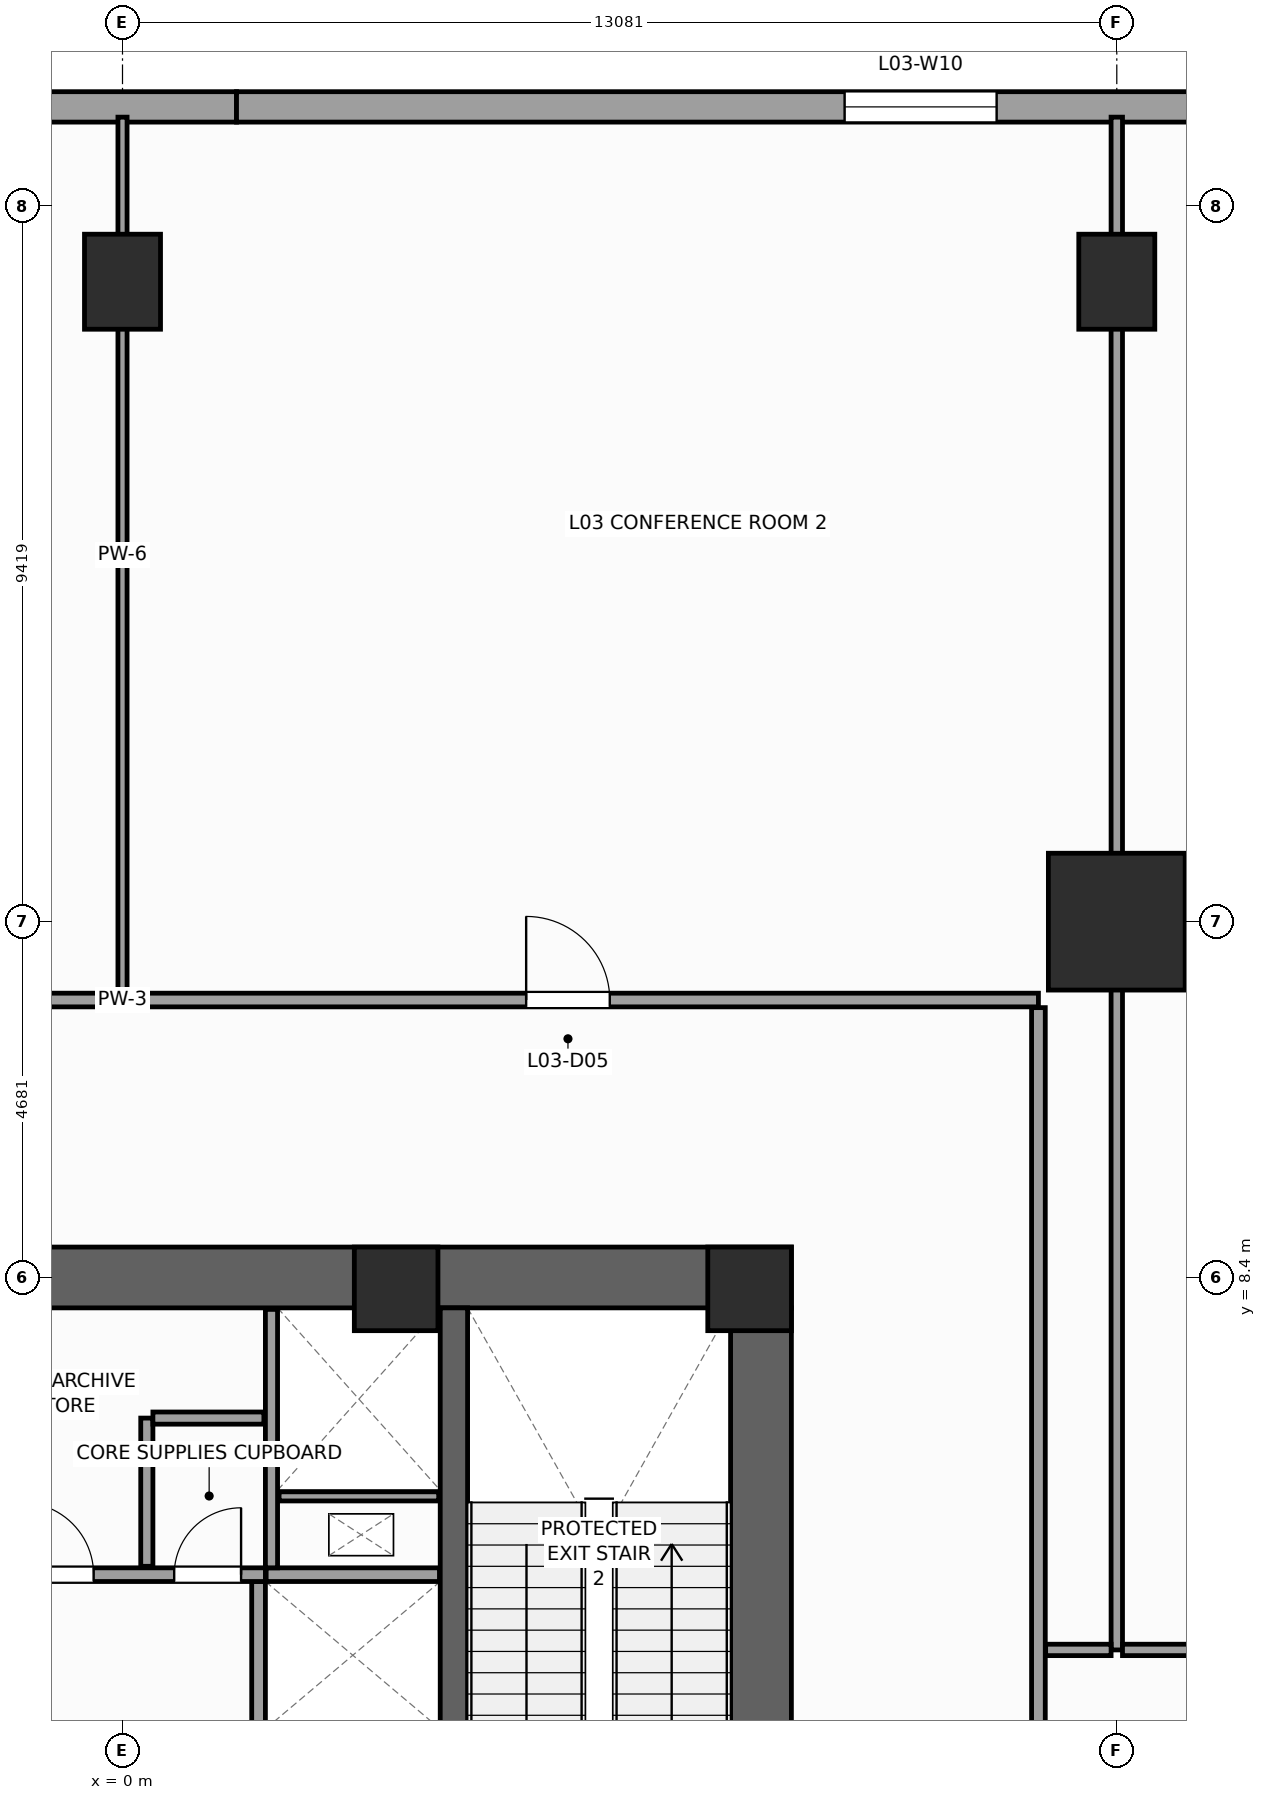
"""IFC4 building model, lengths in metres.
Left out: names, types, materials, properties, quantities, classifications, styles, units other than length and angle.
Written with IfcOpenShell. Run it as: python <this file> out.ifc"""

import sys

from ifc_helpers import new_model, si_unit, direction, frame, frame_2d, origin, origin_2d, place, context, subcontext, project, spatial, rectangle, extrude, source, transform, mapped, element, fill, save


model = new_model("IFC4")
c1 = context("Model", 3, precision=1e-05, world=origin(), true_north=direction((0.0, 1.0)))
c2 = subcontext(c1, "Body", "Model", "MODEL_VIEW")
j1 = project(units=[si_unit("LENGTHUNIT", "METRE"), si_unit("PLANEANGLEUNIT", "RADIAN")], contexts=[c1])
p1 = place(None, origin())
s1 = spatial("IfcSite", under=j1, at=p1, CompositionType="ELEMENT")
p2 = place(p1, origin())
s2 = spatial("IfcBuilding", under=s1, at=p2, CompositionType="ELEMENT")
p3 = place(p2, frame((0.0, 0.0, 16.0)))
s3 = spatial("IfcBuildingStorey", under=s2, at=p3, CompositionType="ELEMENT", Elevation=16.0)
p4 = place(p3, frame((-8.8, 8.4, 0.0), z_axis=(0.0, 0.0, 1.0), x_axis=(1.0, 0.0, 0.0)))
e1 = element("IfcWall", 1, at=p4, inside=s3, PredefinedType="SHEAR", context=c2, shape_type="SweptSolid", body=[
    extrude(rectangle(XDim=17.6, YDim=0.8, at=frame_2d((8.8, 0.0))), origin(), (0.0, 0.0, 1.0), 5.0),
])
p5 = place(p3, frame((8.4, -8.0, 0.0), z_axis=(0.0, 0.0, 1.0), x_axis=(0.0, 1.0, 0.0)))
e2 = element("IfcWall", 2, at=p5, inside=s3, PredefinedType="SHEAR", context=c2, shape_type="SweptSolid", body=[
    extrude(rectangle(XDim=16.0, YDim=0.8, at=frame_2d((8.0, 0.0))), origin(), (0.0, 0.0, 1.0), 5.0),
])
p6 = place(p5, frame((4.69, 0.0, 0.0)))
e3 = element("IfcOpeningElement", 3, at=p6, cuts=e2, PredefinedType="OPENING", context=c2, shape_type="SweptSolid", body=[
    extrude(rectangle(XDim=1.3, YDim=2.2, at=frame_2d((0.65, 1.1))), frame((0.0, 0.41, 0.0), z_axis=(0.0, -1.0, 0.0), x_axis=(1.0, 0.0, 0.0)), (0.0, 0.0, 1.0), 0.82),
])
p7 = place(p3, frame((4.36, -8.0, 0.0), z_axis=(0.0, 0.0, 1.0), x_axis=(0.0, 1.0, 0.0)))
e4 = element("IfcWall", 4, at=p7, inside=s3, PredefinedType="SHEAR", context=c2, shape_type="SweptSolid", body=[
    extrude(rectangle(XDim=16.0, YDim=0.36, at=frame_2d((8.0, 0.0))), origin(), (0.0, 0.0, 1.0), 5.0),
])
m1 = source(origin(), c2, "Body", "SweptSolid", [
    extrude(rectangle(XDim=1.1, YDim=1.1, at=origin_2d()), origin(), (0.0, 0.0, 1.0), 5.0),
])
for number, where, z_axis, x_axis in (
    (5, (8.25, 8.25, 0.0), (0.0, 0.0, 1.0), (1.0, 0.0, 0.0)),
    (6, (3.6, 8.25, 0.0), (0.0, 0.0, 1.0), (1.0, 0.0, 0.0)),
):
    element("IfcColumn", number, at=place(p3, frame(where, z_axis=z_axis, x_axis=x_axis)), inside=s3, PredefinedType="PILASTER", context=c2, shape_type="MappedRepresentation", body=[
        mapped(m1, transform((0.0, 0.0, 0.0), scale=1.0)),
    ])
m2 = source(origin(), c2, "Body", "SweptSolid", [
    extrude(rectangle(XDim=1.8, YDim=1.8, at=origin_2d()), origin(), (0.0, 0.0, 1.0), 5.0),
])
p8 = place(p3, frame((13.081, 13.081, 0.0), z_axis=(0.0, 0.0, 1.0), x_axis=(1.0, 0.0, 0.0)))
e7 = element("IfcColumn", 7, at=p8, inside=s3, PredefinedType="COLUMN", context=c2, shape_type="MappedRepresentation", body=[
    mapped(m2, transform((0.0, 0.0, 0.0), scale=1.0)),
])
m3 = source(origin(), c2, "Body", "SweptSolid", [
    extrude(rectangle(XDim=1.0, YDim=1.25, at=origin_2d()), origin(), (0.0, 0.0, 1.0), 5.0),
])
for number, where, z_axis, x_axis in (
    (8, (0.0, 21.5, 0.0), (0.0, 0.0, 1.0), (1.0, 0.0, 0.0)),
    (9, (13.081, 21.5, 0.0), (0.0, 0.0, 1.0), (1.0, 0.0, 0.0)),
):
    element("IfcColumn", number, at=place(p3, frame(where, z_axis=z_axis, x_axis=x_axis)), inside=s3, PredefinedType="COLUMN", context=c2, shape_type="MappedRepresentation", body=[
        mapped(m3, transform((0.0, 0.0, 0.0), scale=1.0)),
    ])
p9 = place(p3, frame((-33.0, 23.8, 0.0), z_axis=(0.0, 0.0, 1.0), x_axis=(1.0, 0.0, 0.0)))
e10 = element("IfcWall", 10, at=p9, inside=s3, PredefinedType="STANDARD", context=c2, shape_type="SweptSolid", body=[
    extrude(rectangle(XDim=34.5, YDim=0.4, at=frame_2d((17.25, 0.0))), origin(), (0.0, 0.0, 1.0), 4.66),
])
p10 = place(p9, frame((11.0, 0.0, 0.85)))
e11 = element("IfcOpeningElement", 11, at=p10, cuts=e10, PredefinedType="OPENING", context=c2, shape_type="SweptSolid", body=[
    extrude(rectangle(XDim=2.0, YDim=2.8, at=frame_2d((1.0, 1.4))), frame((0.0, 0.21, 0.0), z_axis=(0.0, -1.0, 0.0), x_axis=(1.0, 0.0, 0.0)), (0.0, 0.0, 1.0), 0.42),
])
p11 = place(p9, frame((16.0, 0.0, 0.85)))
e12 = element("IfcOpeningElement", 12, at=p11, cuts=e10, PredefinedType="OPENING", context=c2, shape_type="SweptSolid", body=[
    extrude(rectangle(XDim=2.0, YDim=2.8, at=frame_2d((1.0, 1.4))), frame((0.0, 0.21, 0.0), z_axis=(0.0, -1.0, 0.0), x_axis=(1.0, 0.0, 0.0)), (0.0, 0.0, 1.0), 0.42),
])
p12 = place(p9, frame((21.5, 0.0, 0.85)))
e13 = element("IfcOpeningElement", 13, at=p12, cuts=e10, PredefinedType="OPENING", context=c2, shape_type="SweptSolid", body=[
    extrude(rectangle(XDim=2.0, YDim=2.8, at=frame_2d((1.0, 1.4))), frame((0.0, 0.21, 0.0), z_axis=(0.0, -1.0, 0.0), x_axis=(1.0, 0.0, 0.0)), (0.0, 0.0, 1.0), 0.42),
])
p13 = place(p3, frame((1.5, 23.8, 0.0), z_axis=(0.0, 0.0, 1.0), x_axis=(1.0, 0.0, 0.0)))
e14 = element("IfcWall", 14, at=p13, inside=s3, PredefinedType="STANDARD", context=c2, shape_type="SweptSolid", body=[
    extrude(rectangle(XDim=31.5, YDim=0.4, at=frame_2d((15.75, 0.0))), origin(), (0.0, 0.0, 1.0), 4.66),
])
p14 = place(p13, frame((8.0, 0.0, 0.85)))
e15 = element("IfcOpeningElement", 15, at=p14, cuts=e14, PredefinedType="OPENING", context=c2, shape_type="SweptSolid", body=[
    extrude(rectangle(XDim=2.0, YDim=2.8, at=frame_2d((1.0, 1.4))), frame((0.0, 0.21, 0.0), z_axis=(0.0, -1.0, 0.0), x_axis=(1.0, 0.0, 0.0)), (0.0, 0.0, 1.0), 0.42),
])
p15 = place(p13, frame((13.5, 0.0, 0.85)))
e16 = element("IfcOpeningElement", 16, at=p15, cuts=e14, PredefinedType="OPENING", context=c2, shape_type="SweptSolid", body=[
    extrude(rectangle(XDim=2.0, YDim=2.8, at=frame_2d((1.0, 1.4))), frame((0.0, 0.21, 0.0), z_axis=(0.0, -1.0, 0.0), x_axis=(1.0, 0.0, 0.0)), (0.0, 0.0, 1.0), 0.42),
])
p16 = place(p13, frame((18.5, 0.0, 0.85)))
e17 = element("IfcOpeningElement", 17, at=p16, cuts=e14, PredefinedType="OPENING", context=c2, shape_type="SweptSolid", body=[
    extrude(rectangle(XDim=2.0, YDim=2.8, at=frame_2d((1.0, 1.4))), frame((0.0, 0.21, 0.0), z_axis=(0.0, -1.0, 0.0), x_axis=(1.0, 0.0, 0.0)), (0.0, 0.0, 1.0), 0.42),
])
p17 = place(p3, frame((1.79, -7.98, 0.0), z_axis=(0.0, 0.0, 1.0), x_axis=(0.0, 1.0, 0.0)))
e18 = element("IfcWall", 18, at=p17, inside=s3, PredefinedType="PARTITIONING", context=c2, shape_type="SweptSolid", body=[
    extrude(rectangle(XDim=12.38, YDim=0.18, at=frame_2d((6.19, 0.0))), origin(), (0.0, 0.0, 1.0), 4.66),
])
p18 = place(p17, frame((0.4, 0.0, 0.0)))
e19 = element("IfcOpeningElement", 19, at=p18, cuts=e18, PredefinedType="OPENING", context=c2, shape_type="SweptSolid", body=[
    extrude(rectangle(XDim=1.1, YDim=2.2, at=frame_2d((0.55, 1.1))), frame((0.0, 0.1, 0.0), z_axis=(0.0, -1.0, 0.0), x_axis=(1.0, 0.0, 0.0)), (0.0, 0.0, 1.0), 0.2),
])
p19 = place(p17, frame((2.46, 0.0, 0.0)))
e20 = element("IfcOpeningElement", 20, at=p19, cuts=e18, PredefinedType="OPENING", context=c2, shape_type="SweptSolid", body=[
    extrude(rectangle(XDim=1.1, YDim=2.2, at=frame_2d((0.55, 1.1))), frame((0.0, 0.1, 0.0), z_axis=(0.0, -1.0, 0.0), x_axis=(1.0, 0.0, 0.0)), (0.0, 0.0, 1.0), 0.2),
])
p20 = place(p3, frame((-1.88, 4.49, 0.0), z_axis=(0.0, 0.0, 1.0), x_axis=(1.0, 0.0, 0.0)))
e21 = element("IfcWall", 21, at=p20, inside=s3, PredefinedType="PARTITIONING", context=c2, shape_type="SweptSolid", body=[
    extrude(rectangle(XDim=3.76, YDim=0.18, at=frame_2d((1.88, 0.0))), origin(), (0.0, 0.0, 1.0), 4.66),
])
p21 = place(p20, frame((0.55, 0.0, 0.0)))
e22 = element("IfcOpeningElement", 22, at=p21, cuts=e21, PredefinedType="OPENING", context=c2, shape_type="SweptSolid", body=[
    extrude(rectangle(XDim=0.95, YDim=2.1, at=frame_2d((0.475, 1.05))), frame((0.0, 0.1, 0.0), z_axis=(0.0, -1.0, 0.0), x_axis=(1.0, 0.0, 0.0)), (0.0, 0.0, 1.0), 0.2),
])
p22 = place(p20, frame((2.56, 0.0, 0.0)))
e23 = element("IfcOpeningElement", 23, at=p22, cuts=e21, PredefinedType="OPENING", context=c2, shape_type="SweptSolid", body=[
    extrude(rectangle(XDim=0.88, YDim=2.1, at=frame_2d((0.44, 1.05))), frame((0.0, 0.1, 0.0), z_axis=(0.0, -1.0, 0.0), x_axis=(1.0, 0.0, 0.0)), (0.0, 0.0, 1.0), 0.2),
])
p23 = place(p3, frame((1.89, 4.49, 0.0), z_axis=(0.0, 0.0, 1.0), x_axis=(1.0, 0.0, 0.0)))
e24 = element("IfcWall", 24, at=p23, inside=s3, PredefinedType="PARTITIONING", context=c2, shape_type="SweptSolid", body=[
    extrude(rectangle(XDim=2.28, YDim=0.18, at=frame_2d((1.14, 0.0))), origin(), (0.0, 0.0, 1.0), 4.66),
])
p24 = place(p3, frame((1.96, 4.58, 0.0), z_axis=(0.0, 0.0, 1.0), x_axis=(0.0, 1.0, 0.0)))
e25 = element("IfcWall", 25, at=p24, inside=s3, PredefinedType="PARTITIONING", context=c2, shape_type="SweptSolid", body=[
    extrude(rectangle(XDim=3.4, YDim=0.16, at=frame_2d((1.7, 0.0))), origin(), (0.0, 0.0, 1.0), 4.66),
])
p25 = place(p3, frame((2.06, 5.52, 0.0), z_axis=(0.0, 0.0, 1.0), x_axis=(1.0, 0.0, 0.0)))
e26 = element("IfcWall", 26, at=p25, inside=s3, PredefinedType="PARTITIONING", context=c2, shape_type="SweptSolid", body=[
    extrude(rectangle(XDim=2.1, YDim=0.12, at=frame_2d((1.05, 0.0))), origin(), (0.0, 0.0, 1.0), 4.66),
])
p26 = place(p3, frame((0.32, 4.6, 0.0), z_axis=(0.0, 0.0, 1.0), x_axis=(0.0, 1.0, 0.0)))
e27 = element("IfcWall", 27, at=p26, inside=s3, PredefinedType="PARTITIONING", context=c2, shape_type="SweptSolid", body=[
    extrude(rectangle(XDim=1.95, YDim=0.16, at=frame_2d((0.975, 0.0))), origin(), (0.0, 0.0, 1.0), 4.66),
])
p27 = place(p3, frame((0.4, 6.55, 0.0), z_axis=(0.0, 0.0, 1.0), x_axis=(1.0, 0.0, 0.0)))
e28 = element("IfcWall", 28, at=p27, inside=s3, PredefinedType="PARTITIONING", context=c2, shape_type="SweptSolid", body=[
    extrude(rectangle(XDim=1.46, YDim=0.16, at=frame_2d((0.73, 0.0))), origin(), (0.0, 0.0, 1.0), 4.66),
])
p28 = place(p3, frame((-12.05, 12.05, 0.0), z_axis=(0.0, 0.0, 1.0), x_axis=(1.0, 0.0, 0.0)))
e29 = element("IfcWall", 29, at=p28, inside=s3, PredefinedType="PARTITIONING", context=c2, shape_type="SweptSolid", body=[
    extrude(rectangle(XDim=24.1, YDim=0.18, at=frame_2d((12.05, 0.0))), origin(), (0.0, 0.0, 1.0), 4.66),
])
p29 = place(p28, frame((5.639, 0.0, 0.0)))
e30 = element("IfcOpeningElement", 30, at=p29, cuts=e29, PredefinedType="OPENING", context=c2, shape_type="SweptSolid", body=[
    extrude(rectangle(XDim=1.1, YDim=2.2, at=frame_2d((0.55, 1.1))), frame((0.0, 0.1, 0.0), z_axis=(0.0, -1.0, 0.0), x_axis=(1.0, 0.0, 0.0)), (0.0, 0.0, 1.0), 0.2),
])
p30 = place(p28, frame((17.361, 0.0, 0.0)))
e31 = element("IfcOpeningElement", 31, at=p30, cuts=e29, PredefinedType="OPENING", context=c2, shape_type="SweptSolid", body=[
    extrude(rectangle(XDim=1.1, YDim=2.2, at=frame_2d((0.55, 1.1))), frame((0.0, 0.1, 0.0), z_axis=(0.0, -1.0, 0.0), x_axis=(1.0, 0.0, 0.0)), (0.0, 0.0, 1.0), 0.2),
])
p31 = place(p3, frame((12.05, -4.96, 0.0), z_axis=(0.0, 0.0, 1.0), x_axis=(0.0, 1.0, 0.0)))
e32 = element("IfcWall", 32, at=p31, inside=s3, PredefinedType="PARTITIONING", context=c2, shape_type="SweptSolid", body=[
    extrude(rectangle(XDim=16.91, YDim=0.18, at=frame_2d((8.455, 0.0))), origin(), (0.0, 0.0, 1.0), 4.66),
])
p32 = place(p31, frame((5.835, 0.0, 0.0)))
e33 = element("IfcOpeningElement", 33, at=p32, cuts=e32, PredefinedType="OPENING", context=c2, shape_type="SweptSolid", body=[
    extrude(rectangle(XDim=0.95, YDim=2.15, at=frame_2d((0.475, 1.075))), frame((0.0, 0.1, 0.0), z_axis=(0.0, -1.0, 0.0), x_axis=(1.0, 0.0, 0.0)), (0.0, 0.0, 1.0), 0.2),
])
p33 = place(p3, frame((0.0, 12.145, 0.0), z_axis=(0.0, 0.0, 1.0), x_axis=(0.0, 1.0, 0.0)))
e34 = element("IfcWall", 34, at=p33, inside=s3, PredefinedType="PARTITIONING", context=c2, shape_type="SweptSolid", body=[
    extrude(rectangle(XDim=11.52, YDim=0.12, at=frame_2d((5.76, 0.0))), origin(), (0.0, 0.0, 1.0), 3.95),
])
p34 = place(p3, frame((13.081, 3.5, 0.0), z_axis=(0.0, 0.0, 1.0), x_axis=(0.0, 1.0, 0.0)))
e35 = element("IfcWall", 35, at=p34, inside=s3, PredefinedType="PARTITIONING", context=c2, shape_type="SweptSolid", body=[
    extrude(rectangle(XDim=20.165, YDim=0.15, at=frame_2d((10.083, 0.0))), origin(), (0.0, 0.0, 1.0), 3.652),
])
p35 = place(p3, frame((12.145, 3.5, 0.0), z_axis=(0.0, 0.0, 1.0), x_axis=(1.0, 0.0, 0.0)))
e36 = element("IfcWall", 36, at=p35, inside=s3, PredefinedType="PARTITIONING", context=c2, shape_type="SweptSolid", body=[
    extrude(rectangle(XDim=0.861, YDim=0.15, at=frame_2d((0.431, 0.0))), origin(), (0.0, 0.0, 1.0), 4.66),
])
p36 = place(p3, frame((13.156, 3.5, 0.0), z_axis=(0.0, 0.0, 1.0), x_axis=(1.0, 0.0, 0.0)))
e37 = element("IfcWall", 37, at=p36, inside=s3, PredefinedType="PARTITIONING", context=c2, shape_type="SweptSolid", body=[
    extrude(rectangle(XDim=5.804, YDim=0.15, at=frame_2d((2.902, 0.0))), origin(), (0.0, 0.0, 1.0), 4.66),
])
m4 = source(origin(), c2, "Body", "SweptSolid", [
    extrude(rectangle(XDim=2.0, YDim=2.8, at=frame_2d((1.0, 1.4))), frame((0.0, 0.03, 0.0), z_axis=(0.0, -1.0, 0.0), x_axis=(1.0, 0.0, 0.0)), (0.0, 0.0, 1.0), 0.06),
])
p37 = place(p14, origin())
e38 = element("IfcWindow", 38, at=p37, inside=s3, PartitioningType="SINGLE_PANEL", PredefinedType="WINDOW", context=c2, shape_type="MappedRepresentation", body=[
    mapped(m4, transform((0.0, 0.0, 0.0), scale=1.0)),
])
fill(e15, e38)
m5 = source(origin(), c2, "Body", "SweptSolid", [
    extrude(rectangle(XDim=0.95, YDim=2.1, at=frame_2d((0.475, 1.05))), frame((0.0, 0.025, 0.0), z_axis=(0.0, -1.0, 0.0), x_axis=(1.0, 0.0, 0.0)), (0.0, 0.0, 1.0), 0.05),
])
p38 = place(p21, origin())
e39 = element("IfcDoor", 39, at=p38, inside=s3, OperationType="SINGLE_SWING_LEFT", PredefinedType="DOOR", context=c2, shape_type="MappedRepresentation", body=[
    mapped(m5, transform((0.0, 0.0, 0.0), scale=1.0)),
])
fill(e22, e39)
m6 = source(origin(), c2, "Body", "SweptSolid", [
    extrude(rectangle(XDim=0.88, YDim=2.1, at=frame_2d((0.44, 1.05))), frame((0.0, 0.025, 0.0), z_axis=(0.0, -1.0, 0.0), x_axis=(1.0, 0.0, 0.0)), (0.0, 0.0, 1.0), 0.05),
])
p39 = place(p22, origin())
e40 = element("IfcDoor", 40, at=p39, inside=s3, OperationType="SINGLE_SWING_RIGHT", PredefinedType="DOOR", context=c2, shape_type="MappedRepresentation", body=[
    mapped(m6, transform((0.0, 0.0, 0.0), scale=1.0)),
])
fill(e23, e40)
m7 = source(origin(), c2, "Body", "SweptSolid", [
    extrude(rectangle(XDim=1.1, YDim=2.2, at=frame_2d((0.55, 1.1))), frame((0.0, 0.025, 0.0), z_axis=(0.0, -1.0, 0.0), x_axis=(1.0, 0.0, 0.0)), (0.0, 0.0, 1.0), 0.05),
])
p40 = place(p30, origin())
e41 = element("IfcDoor", 41, at=p40, inside=s3, OperationType="SINGLE_SWING_LEFT", PredefinedType="DOOR", context=c2, shape_type="MappedRepresentation", body=[
    mapped(m7, transform((0.0, 0.0, 0.0), scale=1.0)),
])
fill(e31, e41)
save(model, sys.argv[1])
